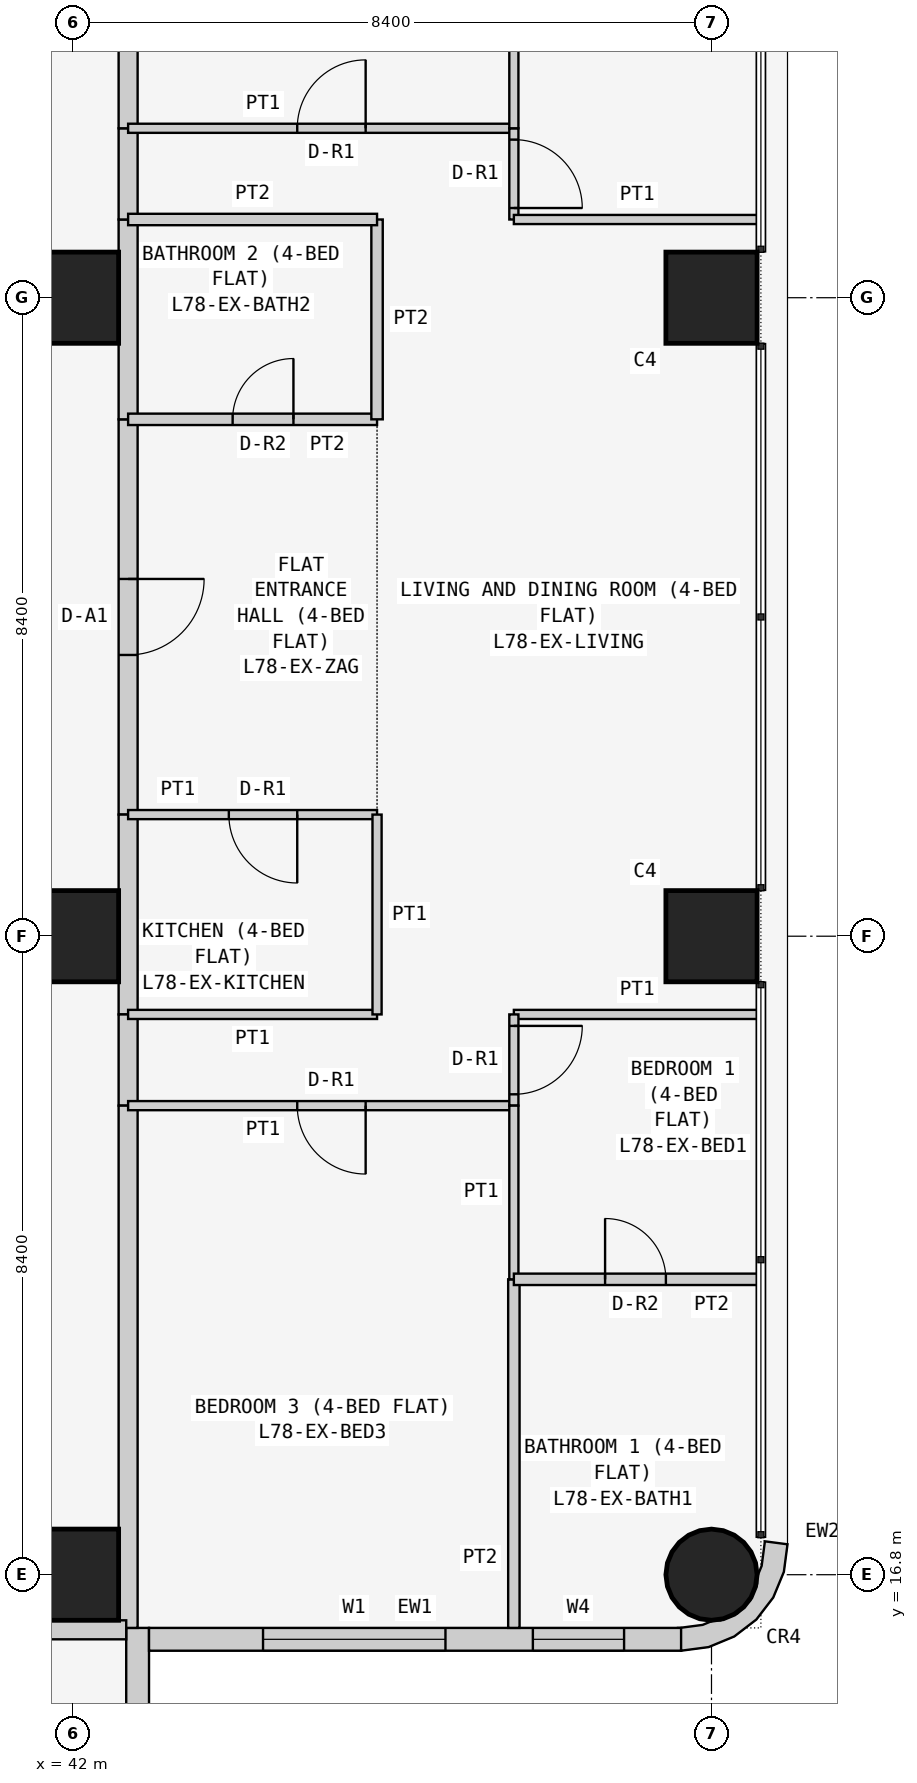
"""IFC4 building model, lengths in metres.
Left out: names, types, materials, properties, quantities, classifications, styles, units other than length and angle.
Written with IfcOpenShell. Run it as: python <this file> out.ifc"""

import sys

from ifc_helpers import new_model, si_unit, direction, frame, frame_2d, origin, origin_2d, place, context, subcontext, project, spatial, polyline, rectangle, circle, outline, extrude, element, fill, save


model = new_model("IFC4")
c1 = context("Model", 3, precision=1e-05, world=origin(), true_north=direction((0.0, 1.0)))
c2 = subcontext(c1, "Body", "Model", "MODEL_VIEW")
j1 = project(units=[si_unit("LENGTHUNIT", "METRE"), si_unit("PLANEANGLEUNIT", "RADIAN")], contexts=[c1])
p1 = place(None, origin())
s1 = spatial("IfcSite", under=j1, at=p1, CompositionType="ELEMENT")
p2 = place(p1, origin())
s2 = spatial("IfcBuilding", under=s1, at=p2, CompositionType="ELEMENT")
p3 = place(p2, frame((0.0, 0.0, 297.3)))
s3 = spatial("IfcBuildingStorey", under=s2, at=p3, CompositionType="ELEMENT", Elevation=297.3)
for number, where, z_axis, x_axis in (
    (1, (42.0, 16.8, 0.0), (0.0, 0.0, 1.0), (1.0, 0.0, 0.0)),
    (2, (42.0, 25.2, 0.0), (0.0, 0.0, 1.0), (1.0, 0.0, 0.0)),
    (3, (42.0, 33.6, 0.0), (0.0, 0.0, 1.0), (1.0, 0.0, 0.0)),
):
    element("IfcColumn", number, at=place(p3, frame(where, z_axis=z_axis, x_axis=x_axis)), inside=s3, PredefinedType="COLUMN", context=c2, shape_type="SweptSolid", body=[
        extrude(rectangle(XDim=1.2, YDim=1.2, at=origin_2d()), origin(), (0.0, 0.0, 1.0), 3.6),
    ])
p4 = place(p3, frame((50.4, 16.8, 0.0), z_axis=(0.0, 0.0, 1.0), x_axis=(1.0, 0.0, 0.0)))
e4 = element("IfcColumn", 4, at=p4, inside=s3, PredefinedType="COLUMN", context=c2, shape_type="SweptSolid", body=[
    extrude(circle(Radius=0.6, at=origin_2d()), origin(), (0.0, 0.0, 1.0), 3.6),
])
for number, where, z_axis, x_axis in (
    (5, (50.4, 25.2, 0.0), (0.0, 0.0, 1.0), (1.0, 0.0, 0.0)),
    (6, (50.4, 33.6, 0.0), (0.0, 0.0, 1.0), (1.0, 0.0, 0.0)),
):
    element("IfcColumn", number, at=place(p3, frame(where, z_axis=z_axis, x_axis=x_axis)), inside=s3, PredefinedType="COLUMN", context=c2, shape_type="SweptSolid", body=[
        extrude(rectangle(XDim=1.2, YDim=1.2, at=origin_2d()), origin(), (0.0, 0.0, 1.0), 3.6),
    ])
p5 = place(p3, frame((42.85, 8.8, 0.0), z_axis=(0.0, 0.0, 1.0), x_axis=(0.0, 1.0, 0.0)))
e7 = element("IfcWall", 7, at=p5, inside=s3, PredefinedType="SOLIDWALL", context=c2, shape_type="SweptSolid", body=[
    extrude(rectangle(XDim=7.3, YDim=0.3, at=frame_2d((3.65, 0.0))), origin(), (0.0, 0.0, 1.0), 3.35),
])
p6 = place(p5, frame((3.1, 0.0, 0.9)))
e8 = element("IfcOpeningElement", 8, at=p6, cuts=e7, PredefinedType="OPENING", context=c2, shape_type="SweptSolid", body=[
    extrude(rectangle(XDim=2.4, YDim=1.5, at=frame_2d((1.2, 0.75))), frame((0.0, 0.16, 0.0), z_axis=(0.0, -1.0, 0.0), x_axis=(1.0, 0.0, 0.0)), (0.0, 0.0, 1.0), 0.32),
])
p7 = place(p5, frame((0.75, 0.0, 0.9)))
e9 = element("IfcOpeningElement", 9, at=p7, cuts=e7, PredefinedType="OPENING", context=c2, shape_type="SweptSolid", body=[
    extrude(rectangle(XDim=1.2, YDim=1.5, at=frame_2d((0.6, 0.75))), frame((0.0, 0.16, 0.0), z_axis=(0.0, -1.0, 0.0), x_axis=(1.0, 0.0, 0.0)), (0.0, 0.0, 1.0), 0.32),
])
p8 = place(p3, frame((43.0, 15.95, 0.0), z_axis=(0.0, 0.0, 1.0), x_axis=(1.0, 0.0, 0.0)))
e10 = element("IfcWall", 10, at=p8, inside=s3, PredefinedType="SOLIDWALL", context=c2, shape_type="SweptSolid", body=[
    extrude(rectangle(XDim=7.0, YDim=0.3, at=frame_2d((3.5, 0.0))), origin(), (0.0, 0.0, 1.0), 3.35),
])
p9 = place(p8, frame((1.5, 0.0, 0.9)))
e11 = element("IfcOpeningElement", 11, at=p9, cuts=e10, PredefinedType="OPENING", context=c2, shape_type="SweptSolid", body=[
    extrude(rectangle(XDim=2.4, YDim=1.5, at=frame_2d((1.2, 0.75))), frame((0.0, 0.16, 0.0), z_axis=(0.0, -1.0, 0.0), x_axis=(1.0, 0.0, 0.0)), (0.0, 0.0, 1.0), 0.32),
])
p10 = place(p8, frame((5.05, 0.0, 0.9)))
e12 = element("IfcOpeningElement", 12, at=p10, cuts=e10, PredefinedType="OPENING", context=c2, shape_type="SweptSolid", body=[
    extrude(rectangle(XDim=1.2, YDim=1.5, at=frame_2d((0.6, 0.75))), frame((0.0, 0.16, 0.0), z_axis=(0.0, -1.0, 0.0), x_axis=(1.0, 0.0, 0.0)), (0.0, 0.0, 1.0), 0.32),
])
p11 = place(p3, frame((50.038, 16.224, 0.0), z_axis=(0.0, 0.0, 1.0), x_axis=(0.707106781187, -0.707106781187, 0.0)))
e13 = element("IfcWall", 13, at=p11, inside=s3, PredefinedType="SOLIDWALL", context=c2, shape_type="SweptSolid", body=[
    extrude(outline(polyline([(0.047, 1.455), (0.233, 1.212), (0.292, 1.069), (0.358, 1.003), (0.449, 0.782), (0.449, 0.543), (0.358, 0.322), (0.292, 0.257), (0.233, 0.114), (0.047, -0.129), (0.033, -0.143), (0.273, -0.327), (0.495, -0.037), (0.635, 0.301), (0.683, 0.663), (0.635, 1.025), (0.495, 1.363), (0.273, 1.653), (0.033, 1.469), (0.047, 1.455)])), origin(), (0.0, 0.0, 1.0), 3.35),
])
p12 = place(p3, frame((42.725, 32.0, 0.0), z_axis=(0.0, 0.0, 1.0), x_axis=(0.0, -1.0, 0.0)))
e14 = element("IfcWall", 14, at=p12, inside=s3, PredefinedType="PARTITIONING", context=c2, shape_type="SweptSolid", body=[
    extrude(rectangle(XDim=5.2, YDim=0.25, at=frame_2d((2.6, 0.0))), origin(), (0.0, 0.0, 1.0), 3.35),
])
p13 = place(p12, frame((2.1, 0.0, 0.0)))
e15 = element("IfcOpeningElement", 15, at=p13, cuts=e14, PredefinedType="OPENING", context=c2, shape_type="SweptSolid", body=[
    extrude(rectangle(XDim=1.0, YDim=2.1, at=frame_2d((0.5, 1.05))), frame((0.0, 0.135, 0.0), z_axis=(0.0, -1.0, 0.0), x_axis=(1.0, 0.0, 0.0)), (0.0, 0.0, 1.0), 0.27),
])
p14 = place(p3, frame((42.725, 34.629, 0.0), z_axis=(0.0, 0.0, 1.0), x_axis=(0.0, -1.0, 0.0)))
e16 = element("IfcWall", 16, at=p14, inside=s3, PredefinedType="PARTITIONING", context=c2, shape_type="SweptSolid", body=[
    extrude(rectangle(XDim=2.629, YDim=0.25, at=frame_2d((1.314, 0.0))), origin(), (0.0, 0.0, 1.0), 3.35),
])
p15 = place(p3, frame((42.725, 26.8, 0.0), z_axis=(0.0, 0.0, 1.0), x_axis=(0.0, -1.0, 0.0)))
e17 = element("IfcWall", 17, at=p15, inside=s3, PredefinedType="PARTITIONING", context=c2, shape_type="SweptSolid", body=[
    extrude(rectangle(XDim=2.629, YDim=0.25, at=frame_2d((1.314, 0.0))), origin(), (0.0, 0.0, 1.0), 3.35),
])
p16 = place(p3, frame((42.725, 24.171, 0.0), z_axis=(0.0, 0.0, 1.0), x_axis=(0.0, -1.0, 0.0)))
e18 = element("IfcWall", 18, at=p16, inside=s3, PredefinedType="PARTITIONING", context=c2, shape_type="SweptSolid", body=[
    extrude(rectangle(XDim=1.2, YDim=0.25, at=frame_2d((0.6, 0.0))), origin(), (0.0, 0.0, 1.0), 3.35),
])
p17 = place(p3, frame((42.725, 35.829, 0.0), z_axis=(0.0, 0.0, 1.0), x_axis=(0.0, -1.0, 0.0)))
e19 = element("IfcWall", 19, at=p17, inside=s3, PredefinedType="PARTITIONING", context=c2, shape_type="SweptSolid", body=[
    extrude(rectangle(XDim=1.2, YDim=0.25, at=frame_2d((0.6, 0.0))), origin(), (0.0, 0.0, 1.0), 3.35),
])
for number, where, z_axis, x_axis in (
    (20, (42.725, 42.7, 0.0), (0.0, 0.0, 1.0), (0.0, -1.0, 0.0)),
    (21, (42.725, 22.971, 0.0), (0.0, 0.0, 1.0), (0.0, -1.0, 0.0)),
    (22, (42.7, 16.075, 0.0), (0.0, 0.0, 1.0), (-1.0, 0.0, 0.0)),
):
    element("IfcWall", number, at=place(p3, frame(where, z_axis=z_axis, x_axis=x_axis)), inside=s3, PredefinedType="PARTITIONING", context=c2, shape_type="SweptSolid", body=[
        extrude(rectangle(XDim=6.871, YDim=0.25, at=frame_2d((3.436, 0.0))), origin(), (0.0, 0.0, 1.0), 3.35),
    ])
p18 = place(p3, frame((46.0, 32.0, 0.0), z_axis=(0.0, 0.0, 1.0), x_axis=(-1.0, 0.0, 0.0)))
e23 = element("IfcWall", 23, at=p18, inside=s3, PredefinedType="PARTITIONING", context=c2, shape_type="SweptSolid", body=[
    extrude(rectangle(XDim=3.275, YDim=0.15, at=frame_2d((1.637, 0.0))), origin(), (0.0, 0.0, 1.0), 3.35),
])
p19 = place(p18, frame((1.1, 0.0, 0.0)))
e24 = element("IfcOpeningElement", 24, at=p19, cuts=e23, PredefinedType="OPENING", context=c2, shape_type="SweptSolid", body=[
    extrude(rectangle(XDim=0.8, YDim=2.1, at=frame_2d((0.4, 1.05))), frame((0.0, 0.085, 0.0), z_axis=(0.0, -1.0, 0.0), x_axis=(1.0, 0.0, 0.0)), (0.0, 0.0, 1.0), 0.17),
])
p20 = place(p3, frame((42.725, 26.8, 0.0), z_axis=(0.0, 0.0, 1.0), x_axis=(1.0, 0.0, 0.0)))
e25 = element("IfcWall", 25, at=p20, inside=s3, PredefinedType="PARTITIONING", context=c2, shape_type="SweptSolid", body=[
    extrude(rectangle(XDim=3.275, YDim=0.12, at=frame_2d((1.637, 0.0))), origin(), (0.0, 0.0, 1.0), 3.35),
])
p21 = place(p20, frame((1.325, 0.0, 0.0)))
e26 = element("IfcOpeningElement", 26, at=p21, cuts=e25, PredefinedType="OPENING", context=c2, shape_type="SweptSolid", body=[
    extrude(rectangle(XDim=0.9, YDim=2.1, at=frame_2d((0.45, 1.05))), frame((0.0, 0.07, 0.0), z_axis=(0.0, -1.0, 0.0), x_axis=(1.0, 0.0, 0.0)), (0.0, 0.0, 1.0), 0.14),
])
p22 = place(p3, frame((46.0, 32.0, 0.0), z_axis=(0.0, 0.0, 1.0), x_axis=(0.0, 1.0, 0.0)))
e27 = element("IfcWall", 27, at=p22, inside=s3, PredefinedType="PARTITIONING", context=c2, shape_type="SweptSolid", body=[
    extrude(rectangle(XDim=2.629, YDim=0.15, at=frame_2d((1.314, 0.0))), origin(), (0.0, 0.0, 1.0), 3.35),
])
p23 = place(p3, frame((46.0, 34.629, 0.0), z_axis=(0.0, 0.0, 1.0), x_axis=(-1.0, 0.0, 0.0)))
e28 = element("IfcWall", 28, at=p23, inside=s3, PredefinedType="PARTITIONING", context=c2, shape_type="SweptSolid", body=[
    extrude(rectangle(XDim=3.275, YDim=0.15, at=frame_2d((1.637, 0.0))), origin(), (0.0, 0.0, 1.0), 3.35),
])
p24 = place(p3, frame((42.725, 24.171, 0.0), z_axis=(0.0, 0.0, 1.0), x_axis=(1.0, 0.0, 0.0)))
e29 = element("IfcWall", 29, at=p24, inside=s3, PredefinedType="PARTITIONING", context=c2, shape_type="SweptSolid", body=[
    extrude(rectangle(XDim=3.275, YDim=0.12, at=frame_2d((1.637, 0.0))), origin(), (0.0, 0.0, 1.0), 3.35),
])
p25 = place(p3, frame((46.0, 24.171, 0.0), z_axis=(0.0, 0.0, 1.0), x_axis=(0.0, 1.0, 0.0)))
e30 = element("IfcWall", 30, at=p25, inside=s3, PredefinedType="PARTITIONING", context=c2, shape_type="SweptSolid", body=[
    extrude(rectangle(XDim=2.629, YDim=0.12, at=frame_2d((1.314, 0.0))), origin(), (0.0, 0.0, 1.0), 3.35),
])
p26 = place(p3, frame((42.725, 35.829, 0.0), z_axis=(0.0, 0.0, 1.0), x_axis=(1.0, 0.0, 0.0)))
e31 = element("IfcWall", 31, at=p26, inside=s3, PredefinedType="PARTITIONING", context=c2, shape_type="SweptSolid", body=[
    extrude(rectangle(XDim=5.075, YDim=0.12, at=frame_2d((2.538, 0.0))), origin(), (0.0, 0.0, 1.0), 3.35),
])
p27 = place(p26, frame((2.225, 0.0, 0.0)))
e32 = element("IfcOpeningElement", 32, at=p27, cuts=e31, PredefinedType="OPENING", context=c2, shape_type="SweptSolid", body=[
    extrude(rectangle(XDim=0.9, YDim=2.1, at=frame_2d((0.45, 1.05))), frame((0.0, 0.07, 0.0), z_axis=(0.0, -1.0, 0.0), x_axis=(1.0, 0.0, 0.0)), (0.0, 0.0, 1.0), 0.14),
])
p28 = place(p3, frame((47.8, 35.829, 0.0), z_axis=(0.0, 0.0, 1.0), x_axis=(0.0, -1.0, 0.0)))
e33 = element("IfcWall", 33, at=p28, inside=s3, PredefinedType="PARTITIONING", context=c2, shape_type="SweptSolid", body=[
    extrude(rectangle(XDim=1.2, YDim=0.12, at=frame_2d((0.6, 0.0))), origin(), (0.0, 0.0, 1.0), 3.35),
])
p29 = place(p28, frame((0.149, 0.0, 0.0)))
e34 = element("IfcOpeningElement", 34, at=p29, cuts=e33, PredefinedType="OPENING", context=c2, shape_type="SweptSolid", body=[
    extrude(rectangle(XDim=0.9, YDim=2.1, at=frame_2d((0.45, 1.05))), frame((0.0, 0.07, 0.0), z_axis=(0.0, -1.0, 0.0), x_axis=(1.0, 0.0, 0.0)), (0.0, 0.0, 1.0), 0.14),
])
p30 = place(p3, frame((47.8, 34.629, 0.0), z_axis=(0.0, 0.0, 1.0), x_axis=(1.0, 0.0, 0.0)))
e35 = element("IfcWall", 35, at=p30, inside=s3, PredefinedType="PARTITIONING", context=c2, shape_type="SweptSolid", body=[
    extrude(rectangle(XDim=3.25, YDim=0.12, at=frame_2d((1.625, 0.0))), origin(), (0.0, 0.0, 1.0), 3.35),
])
p31 = place(p3, frame((47.8, 22.971, 0.0), z_axis=(0.0, 0.0, 1.0), x_axis=(-1.0, 0.0, 0.0)))
e36 = element("IfcWall", 36, at=p31, inside=s3, PredefinedType="PARTITIONING", context=c2, shape_type="SweptSolid", body=[
    extrude(rectangle(XDim=5.075, YDim=0.12, at=frame_2d((2.538, 0.0))), origin(), (0.0, 0.0, 1.0), 3.35),
])
p32 = place(p31, frame((1.95, 0.0, 0.0)))
e37 = element("IfcOpeningElement", 37, at=p32, cuts=e36, PredefinedType="OPENING", context=c2, shape_type="SweptSolid", body=[
    extrude(rectangle(XDim=0.9, YDim=2.1, at=frame_2d((0.45, 1.05))), frame((0.0, 0.07, 0.0), z_axis=(0.0, -1.0, 0.0), x_axis=(1.0, 0.0, 0.0)), (0.0, 0.0, 1.0), 0.14),
])
p33 = place(p3, frame((51.05, 24.171, 0.0), z_axis=(0.0, 0.0, 1.0), x_axis=(-1.0, 0.0, 0.0)))
e38 = element("IfcWall", 38, at=p33, inside=s3, PredefinedType="PARTITIONING", context=c2, shape_type="SweptSolid", body=[
    extrude(rectangle(XDim=3.25, YDim=0.12, at=frame_2d((1.625, 0.0))), origin(), (0.0, 0.0, 1.0), 3.35),
])
p34 = place(p3, frame((47.8, 24.171, 0.0), z_axis=(0.0, 0.0, 1.0), x_axis=(0.0, -1.0, 0.0)))
e39 = element("IfcWall", 39, at=p34, inside=s3, PredefinedType="PARTITIONING", context=c2, shape_type="SweptSolid", body=[
    extrude(rectangle(XDim=1.2, YDim=0.12, at=frame_2d((0.6, 0.0))), origin(), (0.0, 0.0, 1.0), 3.35),
])
p35 = place(p34, frame((0.151, 0.0, 0.0)))
e40 = element("IfcOpeningElement", 40, at=p35, cuts=e39, PredefinedType="OPENING", context=c2, shape_type="SweptSolid", body=[
    extrude(rectangle(XDim=0.9, YDim=2.1, at=frame_2d((0.45, 1.05))), frame((0.0, 0.07, 0.0), z_axis=(0.0, -1.0, 0.0), x_axis=(1.0, 0.0, 0.0)), (0.0, 0.0, 1.0), 0.14),
])
p36 = place(p3, frame((47.8, 35.829, 0.0), z_axis=(0.0, 0.0, 1.0), x_axis=(0.0, 1.0, 0.0)))
e41 = element("IfcWall", 41, at=p36, inside=s3, PredefinedType="PARTITIONING", context=c2, shape_type="SweptSolid", body=[
    extrude(rectangle(XDim=6.871, YDim=0.12, at=frame_2d((3.436, 0.0))), origin(), (0.0, 0.0, 1.0), 3.35),
])
p37 = place(p3, frame((47.8, 16.1, 0.0), z_axis=(0.0, 0.0, 1.0), x_axis=(0.0, 1.0, 0.0)))
e42 = element("IfcWall", 42, at=p37, inside=s3, PredefinedType="PARTITIONING", context=c2, shape_type="SweptSolid", body=[
    extrude(rectangle(XDim=4.586, YDim=0.15, at=frame_2d((2.293, 0.0))), origin(), (0.0, 0.0, 1.0), 3.35),
])
p38 = place(p3, frame((47.8, 20.686, 0.0), z_axis=(0.0, 0.0, 1.0), x_axis=(0.0, 1.0, 0.0)))
e43 = element("IfcWall", 43, at=p38, inside=s3, PredefinedType="PARTITIONING", context=c2, shape_type="SweptSolid", body=[
    extrude(rectangle(XDim=2.285, YDim=0.12, at=frame_2d((1.143, 0.0))), origin(), (0.0, 0.0, 1.0), 3.35),
])
p39 = place(p3, frame((51.05, 20.686, 0.0), z_axis=(0.0, 0.0, 1.0), x_axis=(-1.0, 0.0, 0.0)))
e44 = element("IfcWall", 44, at=p39, inside=s3, PredefinedType="PARTITIONING", context=c2, shape_type="SweptSolid", body=[
    extrude(rectangle(XDim=3.25, YDim=0.15, at=frame_2d((1.625, 0.0))), origin(), (0.0, 0.0, 1.0), 3.35),
])
p40 = place(p39, frame((1.25, 0.0, 0.0)))
e45 = element("IfcOpeningElement", 45, at=p40, cuts=e44, PredefinedType="OPENING", context=c2, shape_type="SweptSolid", body=[
    extrude(rectangle(XDim=0.8, YDim=2.1, at=frame_2d((0.4, 1.05))), frame((0.0, 0.085, 0.0), z_axis=(0.0, -1.0, 0.0), x_axis=(1.0, 0.0, 0.0)), (0.0, 0.0, 1.0), 0.17),
])
p41 = place(p9, origin())
e46 = element("IfcWindow", 46, at=p41, inside=s3, PartitioningType="SINGLE_PANEL", PredefinedType="WINDOW", context=c2, shape_type="SweptSolid", body=[
    extrude(rectangle(XDim=2.4, YDim=1.5, at=frame_2d((1.2, 0.75))), frame((0.0, 0.03, 0.0), z_axis=(0.0, -1.0, 0.0), x_axis=(1.0, 0.0, 0.0)), (0.0, 0.0, 1.0), 0.06),
])
fill(e11, e46)
p42 = place(p10, origin())
e47 = element("IfcWindow", 47, at=p42, inside=s3, PartitioningType="SINGLE_PANEL", PredefinedType="WINDOW", context=c2, shape_type="SweptSolid", body=[
    extrude(rectangle(XDim=1.2, YDim=1.5, at=frame_2d((0.6, 0.75))), frame((0.0, 0.03, 0.0), z_axis=(0.0, -1.0, 0.0), x_axis=(1.0, 0.0, 0.0)), (0.0, 0.0, 1.0), 0.06),
])
fill(e12, e47)
p43 = place(p13, origin())
e48 = element("IfcDoor", 48, at=p43, inside=s3, OperationType="SINGLE_SWING_LEFT", PredefinedType="DOOR", context=c2, shape_type="SweptSolid", body=[
    extrude(rectangle(XDim=1.0, YDim=2.1, at=frame_2d((0.5, 1.05))), frame((0.0, 0.025, 0.0), z_axis=(0.0, -1.0, 0.0), x_axis=(1.0, 0.0, 0.0)), (0.0, 0.0, 1.0), 0.05),
])
fill(e15, e48)
p44 = place(p19, frame((0.8, 0.0, 0.0), z_axis=(0.0, 0.0, 1.0), x_axis=(-1.0, 0.0, 0.0)))
e49 = element("IfcDoor", 49, at=p44, inside=s3, OperationType="SINGLE_SWING_RIGHT", PredefinedType="DOOR", context=c2, shape_type="SweptSolid", body=[
    extrude(rectangle(XDim=0.8, YDim=2.1, at=frame_2d((0.4, 1.05))), frame((0.0, 0.025, 0.0), z_axis=(0.0, -1.0, 0.0), x_axis=(1.0, 0.0, 0.0)), (0.0, 0.0, 1.0), 0.05),
])
fill(e24, e49)
p45 = place(p21, frame((0.9, 0.0, 0.0), z_axis=(0.0, 0.0, 1.0), x_axis=(-1.0, 0.0, 0.0)))
e50 = element("IfcDoor", 50, at=p45, inside=s3, OperationType="SINGLE_SWING_LEFT", PredefinedType="DOOR", context=c2, shape_type="SweptSolid", body=[
    extrude(rectangle(XDim=0.9, YDim=2.1, at=frame_2d((0.45, 1.05))), frame((0.0, 0.025, 0.0), z_axis=(0.0, -1.0, 0.0), x_axis=(1.0, 0.0, 0.0)), (0.0, 0.0, 1.0), 0.05),
])
fill(e26, e50)
p46 = place(p27, origin())
e51 = element("IfcDoor", 51, at=p46, inside=s3, OperationType="SINGLE_SWING_RIGHT", PredefinedType="DOOR", context=c2, shape_type="SweptSolid", body=[
    extrude(rectangle(XDim=0.9, YDim=2.1, at=frame_2d((0.45, 1.05))), frame((0.0, 0.025, 0.0), z_axis=(0.0, -1.0, 0.0), x_axis=(1.0, 0.0, 0.0)), (0.0, 0.0, 1.0), 0.05),
])
fill(e32, e51)
p47 = place(p29, origin())
e52 = element("IfcDoor", 52, at=p47, inside=s3, OperationType="SINGLE_SWING_RIGHT", PredefinedType="DOOR", context=c2, shape_type="SweptSolid", body=[
    extrude(rectangle(XDim=0.9, YDim=2.1, at=frame_2d((0.45, 1.05))), frame((0.0, 0.025, 0.0), z_axis=(0.0, -1.0, 0.0), x_axis=(1.0, 0.0, 0.0)), (0.0, 0.0, 1.0), 0.05),
])
fill(e34, e52)
p48 = place(p32, origin())
e53 = element("IfcDoor", 53, at=p48, inside=s3, OperationType="SINGLE_SWING_LEFT", PredefinedType="DOOR", context=c2, shape_type="SweptSolid", body=[
    extrude(rectangle(XDim=0.9, YDim=2.1, at=frame_2d((0.45, 1.05))), frame((0.0, 0.025, 0.0), z_axis=(0.0, -1.0, 0.0), x_axis=(1.0, 0.0, 0.0)), (0.0, 0.0, 1.0), 0.05),
])
fill(e37, e53)
p49 = place(p35, origin())
e54 = element("IfcDoor", 54, at=p49, inside=s3, OperationType="SINGLE_SWING_LEFT", PredefinedType="DOOR", context=c2, shape_type="SweptSolid", body=[
    extrude(rectangle(XDim=0.9, YDim=2.1, at=frame_2d((0.45, 1.05))), frame((0.0, 0.025, 0.0), z_axis=(0.0, -1.0, 0.0), x_axis=(1.0, 0.0, 0.0)), (0.0, 0.0, 1.0), 0.05),
])
fill(e40, e54)
p50 = place(p40, frame((0.8, 0.0, 0.0), z_axis=(0.0, 0.0, 1.0), x_axis=(-1.0, 0.0, 0.0)))
e55 = element("IfcDoor", 55, at=p50, inside=s3, OperationType="SINGLE_SWING_LEFT", PredefinedType="DOOR", context=c2, shape_type="SweptSolid", body=[
    extrude(rectangle(XDim=0.8, YDim=2.1, at=frame_2d((0.4, 1.05))), frame((0.0, 0.025, 0.0), z_axis=(0.0, -1.0, 0.0), x_axis=(1.0, 0.0, 0.0)), (0.0, 0.0, 1.0), 0.05),
])
fill(e45, e55)
save(model, sys.argv[1])
